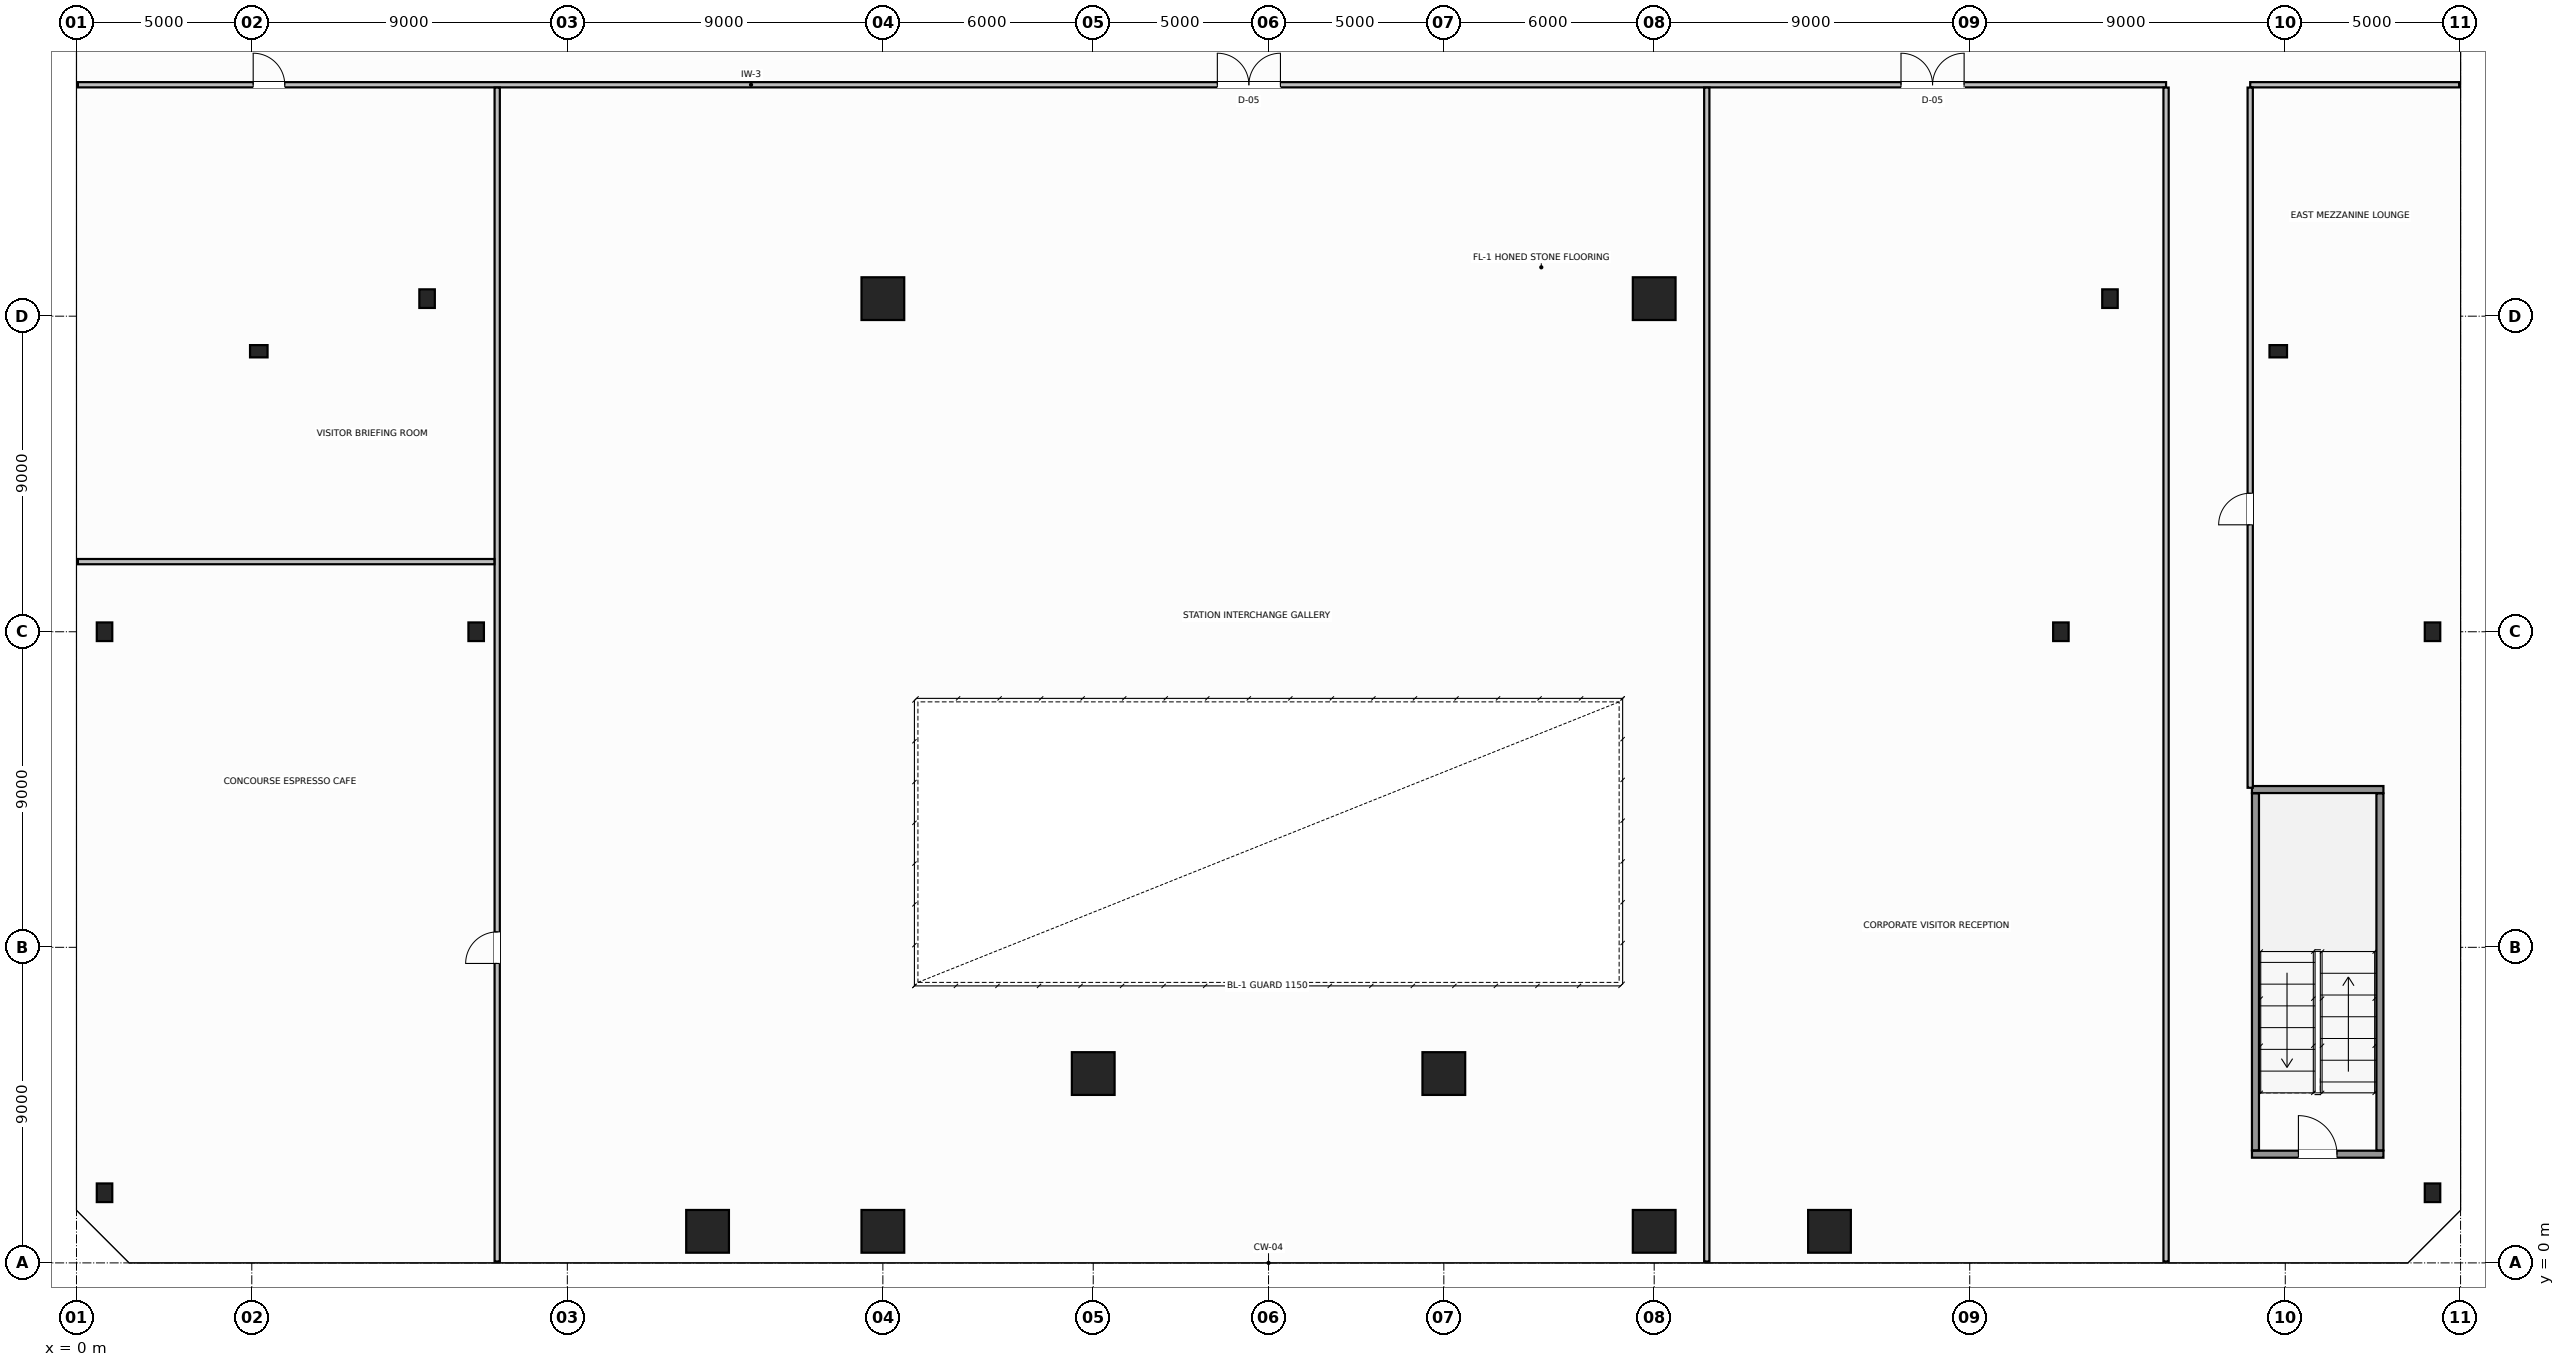
"""IFC4 building model, lengths in metres.
Left out: names, types, materials, properties, quantities, classifications, styles, units other than length and angle.
Written with IfcOpenShell. Run it as: python <this file> out.ifc"""

import sys

from ifc_helpers import new_model, si_unit, direction, frame, frame_2d, origin, origin_2d, place, context, subcontext, project, spatial, rectangle, hollow_circle, i_section, extrude, source, transform, mapped, element, fill, save


model = new_model("IFC4")
c1 = context("Model", 3, precision=1e-05, world=origin(), true_north=direction((0.0, 1.0)))
c2 = subcontext(c1, "Body", "Model", "MODEL_VIEW")
j1 = project(units=[si_unit("LENGTHUNIT", "METRE"), si_unit("PLANEANGLEUNIT", "RADIAN")], contexts=[c1])
p1 = place(None, origin())
s1 = spatial("IfcSite", under=j1, at=p1, CompositionType="ELEMENT")
p2 = place(p1, origin())
s2 = spatial("IfcBuilding", under=s1, at=p2, CompositionType="ELEMENT")
p3 = place(p2, frame((0.0, 0.0, 5.6)))
s3 = spatial("IfcBuildingStorey", under=s2, at=p3, CompositionType="ELEMENT", Elevation=5.6)
m1 = source(origin(), c2, "Body", "SweptSolid", [
    extrude(hollow_circle(Radius=0.61, WallThickness=0.05, at=origin_2d()), origin(), (0.0, 0.0, 1.0), 4.4),
])
for number, where, z_axis, x_axis in (
    (1, (18.0, 0.9, 0.0), (0.0, 0.0, 1.0), (1.0, 0.0, 0.0)),
    (2, (23.0, 0.9, 0.0), (0.0, 0.0, 1.0), (1.0, 0.0, 0.0)),
    (3, (29.0, 5.4, 0.0), (0.0, 0.0, 1.0), (1.0, 0.0, 0.0)),
    (4, (39.0, 5.4, 0.0), (0.0, 0.0, 1.0), (1.0, 0.0, 0.0)),
    (5, (45.0, 0.9, 0.0), (0.0, 0.0, 1.0), (1.0, 0.0, 0.0)),
    (6, (50.0, 0.9, 0.0), (0.0, 0.0, 1.0), (1.0, 0.0, 0.0)),
):
    element("IfcColumn", number, at=place(p3, frame(where, z_axis=z_axis, x_axis=x_axis)), inside=s3, PredefinedType="COLUMN", context=c2, shape_type="MappedRepresentation", body=[
        mapped(m1, transform((0.0, 0.0, 0.0), scale=1.0)),
    ])
m2 = source(origin(), c2, "Body", "SweptSolid", [
    extrude(i_section(OverallWidth=0.442, OverallDepth=0.531, WebThickness=0.065, FlangeThickness=0.076, FilletRadius=0.015, at=origin_2d()), origin(), (0.0, 0.0, 1.0), 4.4),
])
for number, where, z_axis, x_axis in (
    (7, (0.8, 2.0, 0.0), (0.0, 0.0, 1.0), (1.0, 0.0, 0.0)),
    (8, (0.8, 18.0, 0.0), (0.0, 0.0, 1.0), (1.0, 0.0, 0.0)),
    (9, (67.2, 2.0, 0.0), (0.0, 0.0, 1.0), (1.0, 0.0, 0.0)),
    (10, (67.2, 18.0, 0.0), (0.0, 0.0, 1.0), (1.0, 0.0, 0.0)),
    (11, (10.0, 27.5, 0.0), (0.0, 0.0, 1.0), (1.0, 0.0, 0.0)),
    (12, (11.4, 18.0, 0.0), (0.0, 0.0, 1.0), (1.0, 0.0, 0.0)),
    (13, (58.0, 27.5, 0.0), (0.0, 0.0, 1.0), (1.0, 0.0, 0.0)),
    (14, (56.6, 18.0, 0.0), (0.0, 0.0, 1.0), (1.0, 0.0, 0.0)),
):
    element("IfcColumn", number, at=place(p3, frame(where, z_axis=z_axis, x_axis=x_axis)), inside=s3, PredefinedType="COLUMN", context=c2, shape_type="MappedRepresentation", body=[
        mapped(m2, transform((0.0, 0.0, 0.0), scale=1.0)),
    ])
for number, where, z_axis, x_axis in (
    (15, (23.0, 27.5, 0.0), (0.0, 0.0, 1.0), (1.0, 0.0, 0.0)),
    (16, (45.0, 27.5, 0.0), (0.0, 0.0, 1.0), (1.0, 0.0, 0.0)),
):
    element("IfcColumn", number, at=place(p3, frame(where, z_axis=z_axis, x_axis=x_axis)), inside=s3, PredefinedType="COLUMN", context=c2, shape_type="MappedRepresentation", body=[
        mapped(m1, transform((0.0, 0.0, 0.0), scale=1.0)),
    ])
m3 = source(origin(), c2, "Body", "SweptSolid", [
    extrude(rectangle(XDim=0.5, YDim=0.35, at=origin_2d()), origin(), (0.0, 0.0, 1.0), 4.12),
])
for number, where, z_axis, x_axis in (
    (17, (5.2, 26.0, 0.0), (0.0, 0.0, 1.0), (1.0, 0.0, 0.0)),
    (18, (62.8, 26.0, 0.0), (0.0, 0.0, 1.0), (1.0, 0.0, 0.0)),
):
    element("IfcColumn", number, at=place(p3, frame(where, z_axis=z_axis, x_axis=x_axis)), inside=s3, PredefinedType="PILASTER", context=c2, shape_type="MappedRepresentation", body=[
        mapped(m3, transform((0.0, 0.0, 0.0), scale=1.0)),
    ])
p4 = place(p3, frame((62.05, 3.1, 0.0), z_axis=(0.0, 0.0, 1.0), x_axis=(1.0, 0.0, 0.0)))
e19 = element("IfcWall", 19, at=p4, inside=s3, PredefinedType="SOLIDWALL", context=c2, shape_type="SweptSolid", body=[
    extrude(rectangle(XDim=3.75, YDim=0.2, at=frame_2d((1.875, 0.0))), origin(), (0.0, 0.0, 1.0), 4.4),
])
p5 = place(p4, frame((1.325, 0.0, 0.0)))
e20 = element("IfcOpeningElement", 20, at=p5, cuts=e19, PredefinedType="OPENING", context=c2, shape_type="SweptSolid", body=[
    extrude(rectangle(XDim=1.1, YDim=2.15, at=frame_2d((0.55, 1.075))), frame((0.0, 0.11, 0.0), z_axis=(0.0, -1.0, 0.0), x_axis=(1.0, 0.0, 0.0)), (0.0, 0.0, 1.0), 0.22),
])
p6 = place(p3, frame((62.05, 13.5, 0.0), z_axis=(0.0, 0.0, 1.0), x_axis=(1.0, 0.0, 0.0)))
e21 = element("IfcWall", 21, at=p6, inside=s3, PredefinedType="SOLIDWALL", context=c2, shape_type="SweptSolid", body=[
    extrude(rectangle(XDim=3.75, YDim=0.2, at=frame_2d((1.875, 0.0))), origin(), (0.0, 0.0, 1.0), 4.4),
])
for number, where, z_axis, x_axis in (
    (22, (62.15, 3.21, 0.0), (0.0, 0.0, 1.0), (0.0, 1.0, 0.0)),
    (23, (65.7, 3.21, 0.0), (0.0, 0.0, 1.0), (0.0, 1.0, 0.0)),
):
    element("IfcWall", number, at=place(p3, frame(where, z_axis=z_axis, x_axis=x_axis)), inside=s3, PredefinedType="SOLIDWALL", context=c2, shape_type="SweptSolid", body=[
        extrude(rectangle(XDim=10.18, YDim=0.2, at=frame_2d((5.09, 0.0))), origin(), (0.0, 0.0, 1.0), 4.4),
    ])
p7 = place(p3, frame((0.04, 33.6, 0.0), z_axis=(0.0, 0.0, 1.0), x_axis=(1.0, 0.0, 0.0)))
e24 = element("IfcWall", 24, at=p7, inside=s3, PredefinedType="PARTITIONING", context=c2, shape_type="SweptSolid", body=[
    extrude(rectangle(XDim=59.56, YDim=0.15, at=frame_2d((29.78, 0.0))), origin(), (0.0, 0.0, 1.0), 4.12),
])
p8 = place(p7, frame((5.0, 0.0, 0.0)))
e25 = element("IfcOpeningElement", 25, at=p8, cuts=e24, PredefinedType="OPENING", context=c2, shape_type="SweptSolid", body=[
    extrude(rectangle(XDim=0.9, YDim=2.15, at=frame_2d((0.45, 1.075))), frame((0.0, 0.085, 0.0), z_axis=(0.0, -1.0, 0.0), x_axis=(1.0, 0.0, 0.0)), (0.0, 0.0, 1.0), 0.17),
])
p9 = place(p7, frame((32.5, 0.0, 0.0)))
e26 = element("IfcOpeningElement", 26, at=p9, cuts=e24, PredefinedType="OPENING", context=c2, shape_type="SweptSolid", body=[
    extrude(rectangle(XDim=1.8, YDim=2.25, at=frame_2d((0.9, 1.125))), frame((0.0, 0.085, 0.0), z_axis=(0.0, -1.0, 0.0), x_axis=(1.0, 0.0, 0.0)), (0.0, 0.0, 1.0), 0.17),
])
p10 = place(p7, frame((52.0, 0.0, 0.0)))
e27 = element("IfcOpeningElement", 27, at=p10, cuts=e24, PredefinedType="OPENING", context=c2, shape_type="SweptSolid", body=[
    extrude(rectangle(XDim=1.8, YDim=2.25, at=frame_2d((0.9, 1.125))), frame((0.0, 0.085, 0.0), z_axis=(0.0, -1.0, 0.0), x_axis=(1.0, 0.0, 0.0)), (0.0, 0.0, 1.0), 0.17),
])
p11 = place(p3, frame((62.0, 33.6, 0.0), z_axis=(0.0, 0.0, 1.0), x_axis=(1.0, 0.0, 0.0)))
e28 = element("IfcWall", 28, at=p11, inside=s3, PredefinedType="PARTITIONING", context=c2, shape_type="SweptSolid", body=[
    extrude(rectangle(XDim=5.96, YDim=0.15, at=frame_2d((2.98, 0.0))), origin(), (0.0, 0.0, 1.0), 4.12),
])
p12 = place(p3, frame((59.6, 0.04, 0.0), z_axis=(0.0, 0.0, 1.0), x_axis=(0.0, 1.0, 0.0)))
e29 = element("IfcWall", 29, at=p12, inside=s3, PredefinedType="PARTITIONING", context=c2, shape_type="SweptSolid", body=[
    extrude(rectangle(XDim=33.48, YDim=0.15, at=frame_2d((16.74, 0.0))), origin(), (0.0, 0.0, 1.0), 3.2),
])
p13 = place(p3, frame((62.0, 13.55, 0.0), z_axis=(0.0, 0.0, 1.0), x_axis=(0.0, 1.0, 0.0)))
e30 = element("IfcWall", 30, at=p13, inside=s3, PredefinedType="PARTITIONING", context=c2, shape_type="SweptSolid", body=[
    extrude(rectangle(XDim=19.97, YDim=0.15, at=frame_2d((9.985, 0.0))), origin(), (0.0, 0.0, 1.0), 4.12),
])
p14 = place(p13, frame((7.5, 0.0, 0.0)))
e31 = element("IfcOpeningElement", 31, at=p14, cuts=e30, PredefinedType="OPENING", context=c2, shape_type="SweptSolid", body=[
    extrude(rectangle(XDim=0.9, YDim=2.15, at=frame_2d((0.45, 1.075))), frame((0.0, 0.085, 0.0), z_axis=(0.0, -1.0, 0.0), x_axis=(1.0, 0.0, 0.0)), (0.0, 0.0, 1.0), 0.17),
])
p15 = place(p3, frame((12.0, 0.04, 0.0), z_axis=(0.0, 0.0, 1.0), x_axis=(0.0, 1.0, 0.0)))
e32 = element("IfcWall", 32, at=p15, inside=s3, PredefinedType="PARTITIONING", context=c2, shape_type="SweptSolid", body=[
    extrude(rectangle(XDim=33.48, YDim=0.15, at=frame_2d((16.74, 0.0))), origin(), (0.0, 0.0, 1.0), 3.2),
])
p16 = place(p15, frame((8.5, 0.0, 0.0)))
e33 = element("IfcOpeningElement", 33, at=p16, cuts=e32, PredefinedType="OPENING", context=c2, shape_type="SweptSolid", body=[
    extrude(rectangle(XDim=0.9, YDim=2.15, at=frame_2d((0.45, 1.075))), frame((0.0, 0.085, 0.0), z_axis=(0.0, -1.0, 0.0), x_axis=(1.0, 0.0, 0.0)), (0.0, 0.0, 1.0), 0.17),
])
p17 = place(p3, frame((0.04, 20.0, 0.0), z_axis=(0.0, 0.0, 1.0), x_axis=(1.0, 0.0, 0.0)))
e34 = element("IfcWall", 34, at=p17, inside=s3, PredefinedType="PARTITIONING", context=c2, shape_type="SweptSolid", body=[
    extrude(rectangle(XDim=11.88, YDim=0.15, at=frame_2d((5.94, 0.0))), origin(), (0.0, 0.0, 1.0), 4.12),
])
p18 = place(p3, frame((46.5, 0.04, 0.0), z_axis=(0.0, 0.0, 1.0), x_axis=(0.0, 1.0, 0.0)))
e35 = element("IfcWall", 35, at=p18, inside=s3, PredefinedType="PARTITIONING", context=c2, shape_type="SweptSolid", body=[
    extrude(rectangle(XDim=33.48, YDim=0.15, at=frame_2d((16.74, 0.0))), origin(), (0.0, 0.0, 1.0), 4.12),
])
m4 = source(origin(), c2, "Body", "SweptSolid", [
    extrude(rectangle(XDim=1.1, YDim=2.15, at=frame_2d((0.55, 1.075))), frame((0.0, 0.025, 0.0), z_axis=(0.0, -1.0, 0.0), x_axis=(1.0, 0.0, 0.0)), (0.0, 0.0, 1.0), 0.05),
])
p19 = place(p5, origin())
e36 = element("IfcDoor", 36, at=p19, inside=s3, OperationType="SINGLE_SWING_RIGHT", PredefinedType="DOOR", context=c2, shape_type="MappedRepresentation", body=[
    mapped(m4, transform((0.0, 0.0, 0.0), scale=1.0)),
])
fill(e20, e36)
m5 = source(origin(), c2, "Body", "SweptSolid", [
    extrude(rectangle(XDim=0.9, YDim=2.15, at=frame_2d((0.45, 1.075))), frame((0.0, 0.025, 0.0), z_axis=(0.0, -1.0, 0.0), x_axis=(1.0, 0.0, 0.0)), (0.0, 0.0, 1.0), 0.05),
])
p20 = place(p8, origin())
e37 = element("IfcDoor", 37, at=p20, inside=s3, OperationType="SINGLE_SWING_LEFT", PredefinedType="DOOR", context=c2, shape_type="MappedRepresentation", body=[
    mapped(m5, transform((0.0, 0.0, 0.0), scale=1.0)),
])
fill(e25, e37)
p21 = place(p16, origin())
e38 = element("IfcDoor", 38, at=p21, inside=s3, OperationType="SINGLE_SWING_RIGHT", PredefinedType="DOOR", context=c2, shape_type="MappedRepresentation", body=[
    mapped(m5, transform((0.0, 0.0, 0.0), scale=1.0)),
])
fill(e33, e38)
m6 = source(origin(), c2, "Body", "SweptSolid", [
    extrude(rectangle(XDim=1.8, YDim=2.25, at=frame_2d((0.9, 1.125))), frame((0.0, 0.025, 0.0), z_axis=(0.0, -1.0, 0.0), x_axis=(1.0, 0.0, 0.0)), (0.0, 0.0, 1.0), 0.05),
])
p22 = place(p9, origin())
e39 = element("IfcDoor", 39, at=p22, inside=s3, OperationType="DOUBLE_DOOR_SINGLE_SWING", PredefinedType="DOOR", context=c2, shape_type="MappedRepresentation", body=[
    mapped(m6, transform((0.0, 0.0, 0.0), scale=1.0)),
])
fill(e26, e39)
p23 = place(p10, origin())
e40 = element("IfcDoor", 40, at=p23, inside=s3, OperationType="DOUBLE_DOOR_SINGLE_SWING", PredefinedType="DOOR", context=c2, shape_type="MappedRepresentation", body=[
    mapped(m6, transform((0.0, 0.0, 0.0), scale=1.0)),
])
fill(e27, e40)
p24 = place(p14, origin())
e41 = element("IfcDoor", 41, at=p24, inside=s3, OperationType="SINGLE_SWING_LEFT", PredefinedType="DOOR", context=c2, shape_type="MappedRepresentation", body=[
    mapped(m5, transform((0.0, 0.0, 0.0), scale=1.0)),
])
fill(e31, e41)
save(model, sys.argv[1])
